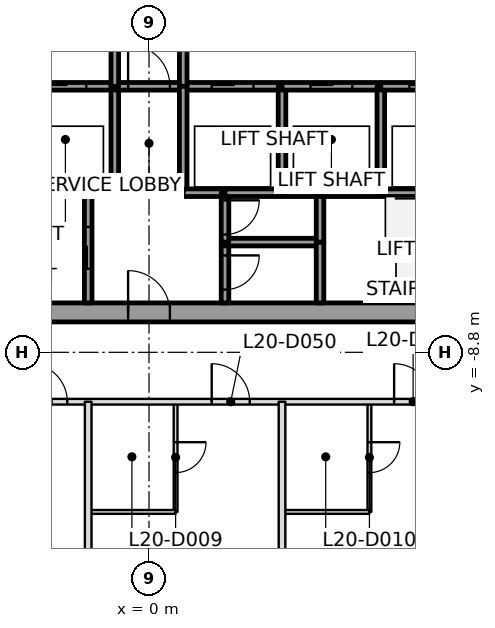
"""IFC4 building model, lengths in metres.
Left out: names, types, materials, properties, quantities, classifications, styles, units other than length and angle.
Written with IfcOpenShell. Run it as: python <this file> out.ifc"""

import sys

from ifc_helpers import new_model, si_unit, direction, frame, frame_2d, origin, place, context, subcontext, project, spatial, rectangle, extrude, element, fill, save


model = new_model("IFC4")
c1 = context("Model", 3, precision=1e-05, world=origin(), true_north=direction((0.0, 1.0)))
c2 = subcontext(c1, "Body", "Model", "MODEL_VIEW")
j1 = project(units=[si_unit("LENGTHUNIT", "METRE"), si_unit("PLANEANGLEUNIT", "RADIAN")], contexts=[c1])
p1 = place(None, origin())
s1 = spatial("IfcSite", under=j1, at=p1, CompositionType="ELEMENT")
p2 = place(p1, origin())
s2 = spatial("IfcBuilding", under=s1, at=p2, CompositionType="ELEMENT")
p3 = place(p2, frame((0.0, 0.0, 96.1)))
s3 = spatial("IfcBuildingStorey", under=s2, at=p3, CompositionType="ELEMENT", Elevation=96.1)
p4 = place(p3, frame((-11.0, -7.75, 0.0), z_axis=(0.0, 0.0, 1.0), x_axis=(1.0, 0.0, 0.0)))
e1 = element("IfcWall", 1, at=p4, inside=s3, PredefinedType="SHEAR", context=c2, shape_type="SweptSolid", body=[
    extrude(rectangle(XDim=22.0, YDim=0.5, at=frame_2d((11.0, 0.0))), origin(), (0.0, 0.0, 1.0), 3.7),
])
p5 = place(p4, frame((10.45, 0.0, 0.0)))
e2 = element("IfcOpeningElement", 2, at=p5, cuts=e1, PredefinedType="OPENING", context=c2, shape_type="SweptSolid", body=[
    extrude(rectangle(XDim=1.1, YDim=2.1, at=frame_2d((0.55, 1.05))), frame((0.0, 0.25, 0.0), z_axis=(0.0, -1.0, 0.0), x_axis=(1.0, 0.0, 0.0)), (0.0, 0.0, 1.0), 0.5),
])
p6 = place(p3, frame((-3.5, -4.6, 0.0), z_axis=(0.0, 0.0, 1.0), x_axis=(1.0, 0.0, 0.0)))
e3 = element("IfcWall", 3, at=p6, inside=s3, PredefinedType="SOLIDWALL", context=c2, shape_type="SweptSolid", body=[
    extrude(rectangle(XDim=1.9, YDim=0.2, at=frame_2d((0.95, 0.0))), origin(), (0.0, 0.0, 1.0), 3.55),
])
p7 = place(p3, frame((-3.5, -1.8, 0.0), z_axis=(0.0, 0.0, 1.0), x_axis=(1.0, 0.0, 0.0)))
e4 = element("IfcWall", 4, at=p7, inside=s3, PredefinedType="SOLIDWALL", context=c2, shape_type="SweptSolid", body=[
    extrude(rectangle(XDim=2.6, YDim=0.2, at=frame_2d((1.3, 0.0))), origin(), (0.0, 0.0, 1.0), 3.55),
])
p8 = place(p7, frame((0.75, 0.0, 0.0)))
e5 = element("IfcOpeningElement", 5, at=p8, cuts=e4, PredefinedType="OPENING", context=c2, shape_type="SweptSolid", body=[
    extrude(rectangle(XDim=1.1, YDim=2.1, at=frame_2d((0.55, 1.05))), frame((0.0, 0.1, 0.0), z_axis=(0.0, -1.0, 0.0), x_axis=(1.0, 0.0, 0.0)), (0.0, 0.0, 1.0), 0.2),
])
p9 = place(p3, frame((-1.6, -7.5, 0.0), z_axis=(0.0, 0.0, 1.0), x_axis=(0.0, 1.0, 0.0)))
e6 = element("IfcWall", 6, at=p9, inside=s3, PredefinedType="SOLIDWALL", context=c2, shape_type="SweptSolid", body=[
    extrude(rectangle(XDim=2.9, YDim=0.2, at=frame_2d((1.45, 0.0))), origin(), (0.0, 0.0, 1.0), 3.55),
])
p10 = place(p9, frame((0.9, 0.0, 0.0)))
e7 = element("IfcOpeningElement", 7, at=p10, cuts=e6, PredefinedType="OPENING", context=c2, shape_type="SweptSolid", body=[
    extrude(rectangle(XDim=1.1, YDim=2.1, at=frame_2d((0.55, 1.05))), frame((0.0, 0.1, 0.0), z_axis=(0.0, -1.0, 0.0), x_axis=(1.0, 0.0, 0.0)), (0.0, 0.0, 1.0), 0.2),
])
p11 = place(p3, frame((-1.6, -4.6, 0.0), z_axis=(0.0, 0.0, 1.0), x_axis=(1.0, 0.0, 0.0)))
e8 = element("IfcWall", 8, at=p11, inside=s3, PredefinedType="SOLIDWALL", context=c2, shape_type="SweptSolid", body=[
    extrude(rectangle(XDim=0.7, YDim=0.2, at=frame_2d((0.35, 0.0))), origin(), (0.0, 0.0, 1.0), 3.55),
])
p12 = place(p3, frame((-0.9, -4.6, 0.0), z_axis=(0.0, 0.0, 1.0), x_axis=(0.0, 1.0, 0.0)))
e9 = element("IfcWall", 9, at=p12, inside=s3, PredefinedType="SOLIDWALL", context=c2, shape_type="SweptSolid", body=[
    extrude(rectangle(XDim=2.8, YDim=0.2, at=frame_2d((1.4, 0.0))), origin(), (0.0, 0.0, 1.0), 3.55),
])
p13 = place(p3, frame((-0.9, -1.8, 0.0), z_axis=(0.0, 0.0, 1.0), x_axis=(1.0, 0.0, 0.0)))
e10 = element("IfcWall", 10, at=p13, inside=s3, PredefinedType="SOLIDWALL", context=c2, shape_type="SweptSolid", body=[
    extrude(rectangle(XDim=1.8, YDim=0.2, at=frame_2d((0.9, 0.0))), origin(), (0.0, 0.0, 1.0), 3.55),
])
p14 = place(p13, frame((0.35, 0.0, 0.0)))
e11 = element("IfcOpeningElement", 11, at=p14, cuts=e10, PredefinedType="OPENING", context=c2, shape_type="SweptSolid", body=[
    extrude(rectangle(XDim=1.1, YDim=2.1, at=frame_2d((0.55, 1.05))), frame((0.0, 0.1, 0.0), z_axis=(0.0, -1.0, 0.0), x_axis=(1.0, 0.0, 0.0)), (0.0, 0.0, 1.0), 0.2),
])
p15 = place(p3, frame((-0.9, 1.8, 0.0), z_axis=(0.0, 0.0, 1.0), x_axis=(0.0, -1.0, 0.0)))
e12 = element("IfcWall", 12, at=p15, inside=s3, PredefinedType="SOLIDWALL", context=c2, shape_type="SweptSolid", body=[
    extrude(rectangle(XDim=3.6, YDim=0.2, at=frame_2d((1.8, 0.0))), origin(), (0.0, 0.0, 1.0), 3.55),
])
p16 = place(p15, frame((1.05, 0.0, 0.0)))
e13 = element("IfcOpeningElement", 13, at=p16, cuts=e12, PredefinedType="OPENING", context=c2, shape_type="SweptSolid", body=[
    extrude(rectangle(XDim=1.5, YDim=2.1, at=frame_2d((0.75, 1.05))), frame((0.0, 0.1, 0.0), z_axis=(0.0, -1.0, 0.0), x_axis=(1.0, 0.0, 0.0)), (0.0, 0.0, 1.0), 0.2),
])
p17 = place(p3, frame((0.9, -1.8, 0.0), z_axis=(0.0, 0.0, 1.0), x_axis=(1.0, 0.0, 0.0)))
e14 = element("IfcWall", 14, at=p17, inside=s3, PredefinedType="SOLIDWALL", context=c2, shape_type="SweptSolid", body=[
    extrude(rectangle(XDim=2.6, YDim=0.2, at=frame_2d((1.3, 0.0))), origin(), (0.0, 0.0, 1.0), 3.55),
])
p18 = place(p17, frame((0.75, 0.0, 0.0)))
e15 = element("IfcOpeningElement", 15, at=p18, cuts=e14, PredefinedType="OPENING", context=c2, shape_type="SweptSolid", body=[
    extrude(rectangle(XDim=1.1, YDim=2.1, at=frame_2d((0.55, 1.05))), frame((0.0, 0.1, 0.0), z_axis=(0.0, -1.0, 0.0), x_axis=(1.0, 0.0, 0.0)), (0.0, 0.0, 1.0), 0.2),
])
p19 = place(p3, frame((0.9, -1.8, 0.0), z_axis=(0.0, 0.0, 1.0), x_axis=(0.0, 1.0, 0.0)))
e16 = element("IfcWall", 16, at=p19, inside=s3, PredefinedType="SOLIDWALL", context=c2, shape_type="SweptSolid", body=[
    extrude(rectangle(XDim=3.6, YDim=0.2, at=frame_2d((1.8, 0.0))), origin(), (0.0, 0.0, 1.0), 3.55),
])
p20 = place(p19, frame((1.05, 0.0, 0.0)))
e17 = element("IfcOpeningElement", 17, at=p20, cuts=e16, PredefinedType="OPENING", context=c2, shape_type="SweptSolid", body=[
    extrude(rectangle(XDim=1.5, YDim=2.1, at=frame_2d((0.75, 1.05))), frame((0.0, 0.1, 0.0), z_axis=(0.0, -1.0, 0.0), x_axis=(1.0, 0.0, 0.0)), (0.0, 0.0, 1.0), 0.2),
])
p21 = place(p3, frame((0.9, -1.8, 0.0), z_axis=(0.0, 0.0, 1.0), x_axis=(0.0, -1.0, 0.0)))
e18 = element("IfcWall", 18, at=p21, inside=s3, PredefinedType="SOLIDWALL", context=c2, shape_type="SweptSolid", body=[
    extrude(rectangle(XDim=2.8, YDim=0.2, at=frame_2d((1.4, 0.0))), origin(), (0.0, 0.0, 1.0), 3.55),
])
p22 = place(p3, frame((0.9, -4.6, 0.0), z_axis=(0.0, 0.0, 1.0), x_axis=(1.0, 0.0, 0.0)))
e19 = element("IfcWall", 19, at=p22, inside=s3, PredefinedType="SOLIDWALL", context=c2, shape_type="SweptSolid", body=[
    extrude(rectangle(XDim=1.1, YDim=0.2, at=frame_2d((0.55, 0.0))), origin(), (0.0, 0.0, 1.0), 3.55),
])
p23 = place(p3, frame((2.0, -5.9, 0.0), z_axis=(0.0, 0.0, 1.0), x_axis=(0.0, -1.0, 0.0)))
e20 = element("IfcWall", 20, at=p23, inside=s3, PredefinedType="SOLIDWALL", context=c2, shape_type="SweptSolid", body=[
    extrude(rectangle(XDim=1.6, YDim=0.2, at=frame_2d((0.8, 0.0))), origin(), (0.0, 0.0, 1.0), 3.55),
])
p24 = place(p23, frame((0.35, 0.0, 0.0)))
e21 = element("IfcOpeningElement", 21, at=p24, cuts=e20, PredefinedType="OPENING", context=c2, shape_type="SweptSolid", body=[
    extrude(rectangle(XDim=0.9, YDim=2.1, at=frame_2d((0.45, 1.05))), frame((0.0, 0.1, 0.0), z_axis=(0.0, -1.0, 0.0), x_axis=(1.0, 0.0, 0.0)), (0.0, 0.0, 1.0), 0.2),
])
p25 = place(p3, frame((4.5, -5.9, 0.0), z_axis=(0.0, 0.0, 1.0), x_axis=(-1.0, 0.0, 0.0)))
e22 = element("IfcWall", 22, at=p25, inside=s3, PredefinedType="SOLIDWALL", context=c2, shape_type="SweptSolid", body=[
    extrude(rectangle(XDim=2.5, YDim=0.2, at=frame_2d((1.25, 0.0))), origin(), (0.0, 0.0, 1.0), 3.55),
])
p26 = place(p3, frame((2.0, -4.6, 0.0), z_axis=(0.0, 0.0, 1.0), x_axis=(0.0, -1.0, 0.0)))
e23 = element("IfcWall", 23, at=p26, inside=s3, PredefinedType="SOLIDWALL", context=c2, shape_type="SweptSolid", body=[
    extrude(rectangle(XDim=1.3, YDim=0.2, at=frame_2d((0.65, 0.0))), origin(), (0.0, 0.0, 1.0), 3.55),
])
p27 = place(p26, frame((0.2, 0.0, 0.0)))
e24 = element("IfcOpeningElement", 24, at=p27, cuts=e23, PredefinedType="OPENING", context=c2, shape_type="SweptSolid", body=[
    extrude(rectangle(XDim=0.9, YDim=2.1, at=frame_2d((0.45, 1.05))), frame((0.0, 0.1, 0.0), z_axis=(0.0, -1.0, 0.0), x_axis=(1.0, 0.0, 0.0)), (0.0, 0.0, 1.0), 0.2),
])
p28 = place(p3, frame((3.5, -4.6, 0.0), z_axis=(0.0, 0.0, 1.0), x_axis=(-1.0, 0.0, 0.0)))
e25 = element("IfcWall", 25, at=p28, inside=s3, PredefinedType="SOLIDWALL", context=c2, shape_type="SweptSolid", body=[
    extrude(rectangle(XDim=1.5, YDim=0.2, at=frame_2d((0.75, 0.0))), origin(), (0.0, 0.0, 1.0), 3.55),
])
p29 = place(p3, frame((4.5, -4.6, 0.0), z_axis=(0.0, 0.0, 1.0), x_axis=(-1.0, 0.0, 0.0)))
e26 = element("IfcWall", 26, at=p29, inside=s3, PredefinedType="SOLIDWALL", context=c2, shape_type="SweptSolid", body=[
    extrude(rectangle(XDim=1.0, YDim=0.2, at=frame_2d((0.5, 0.0))), origin(), (0.0, 0.0, 1.0), 3.55),
])
p30 = place(p3, frame((3.5, -4.6, 0.0), z_axis=(0.0, 0.0, 1.0), x_axis=(0.0, 1.0, 0.0)))
e27 = element("IfcWall", 27, at=p30, inside=s3, PredefinedType="SOLIDWALL", context=c2, shape_type="SweptSolid", body=[
    extrude(rectangle(XDim=2.8, YDim=0.2, at=frame_2d((1.4, 0.0))), origin(), (0.0, 0.0, 1.0), 3.55),
])
p31 = place(p3, frame((3.5, -1.8, 0.0), z_axis=(0.0, 0.0, 1.0), x_axis=(1.0, 0.0, 0.0)))
e28 = element("IfcWall", 28, at=p31, inside=s3, PredefinedType="SOLIDWALL", context=c2, shape_type="SweptSolid", body=[
    extrude(rectangle(XDim=2.6, YDim=0.2, at=frame_2d((1.3, 0.0))), origin(), (0.0, 0.0, 1.0), 3.55),
])
p32 = place(p31, frame((0.75, 0.0, 0.0)))
e29 = element("IfcOpeningElement", 29, at=p32, cuts=e28, PredefinedType="OPENING", context=c2, shape_type="SweptSolid", body=[
    extrude(rectangle(XDim=1.1, YDim=2.1, at=frame_2d((0.55, 1.05))), frame((0.0, 0.1, 0.0), z_axis=(0.0, -1.0, 0.0), x_axis=(1.0, 0.0, 0.0)), (0.0, 0.0, 1.0), 0.2),
])
p33 = place(p3, frame((4.5, -7.5, 0.0), z_axis=(0.0, 0.0, 1.0), x_axis=(0.0, 1.0, 0.0)))
e30 = element("IfcWall", 30, at=p33, inside=s3, PredefinedType="SOLIDWALL", context=c2, shape_type="SweptSolid", body=[
    extrude(rectangle(XDim=1.6, YDim=0.2, at=frame_2d((0.8, 0.0))), origin(), (0.0, 0.0, 1.0), 3.55),
])
p34 = place(p3, frame((4.5, -5.9, 0.0), z_axis=(0.0, 0.0, 1.0), x_axis=(0.0, 1.0, 0.0)))
e31 = element("IfcWall", 31, at=p34, inside=s3, PredefinedType="SOLIDWALL", context=c2, shape_type="SweptSolid", body=[
    extrude(rectangle(XDim=1.3, YDim=0.2, at=frame_2d((0.65, 0.0))), origin(), (0.0, 0.0, 1.0), 3.55),
])
p35 = place(p3, frame((4.5, -4.6, 0.0), z_axis=(0.0, 0.0, 1.0), x_axis=(1.0, 0.0, 0.0)))
e32 = element("IfcWall", 32, at=p35, inside=s3, PredefinedType="SOLIDWALL", context=c2, shape_type="SweptSolid", body=[
    extrude(rectangle(XDim=1.6, YDim=0.2, at=frame_2d((0.8, 0.0))), origin(), (0.0, 0.0, 1.0), 3.55),
])
p36 = place(p3, frame((6.1, -4.6, 0.0), z_axis=(0.0, 0.0, 1.0), x_axis=(1.0, 0.0, 0.0)))
e33 = element("IfcWall", 33, at=p36, inside=s3, PredefinedType="SOLIDWALL", context=c2, shape_type="SweptSolid", body=[
    extrude(rectangle(XDim=2.6, YDim=0.2, at=frame_2d((1.3, 0.0))), origin(), (0.0, 0.0, 1.0), 3.55),
])
p37 = place(p3, frame((6.1, -4.6, 0.0), z_axis=(0.0, 0.0, 1.0), x_axis=(0.0, 1.0, 0.0)))
e34 = element("IfcWall", 34, at=p37, inside=s3, PredefinedType="SOLIDWALL", context=c2, shape_type="SweptSolid", body=[
    extrude(rectangle(XDim=2.8, YDim=0.2, at=frame_2d((1.4, 0.0))), origin(), (0.0, 0.0, 1.0), 3.55),
])
p38 = place(p3, frame((6.1, -1.8, 0.0), z_axis=(0.0, 0.0, 1.0), x_axis=(1.0, 0.0, 0.0)))
e35 = element("IfcWall", 35, at=p38, inside=s3, PredefinedType="SOLIDWALL", context=c2, shape_type="SweptSolid", body=[
    extrude(rectangle(XDim=2.6, YDim=0.2, at=frame_2d((1.3, 0.0))), origin(), (0.0, 0.0, 1.0), 3.55),
])
p39 = place(p38, frame((0.75, 0.0, 0.0)))
e36 = element("IfcOpeningElement", 36, at=p39, cuts=e35, PredefinedType="OPENING", context=c2, shape_type="SweptSolid", body=[
    extrude(rectangle(XDim=1.1, YDim=2.1, at=frame_2d((0.55, 1.05))), frame((0.0, 0.1, 0.0), z_axis=(0.0, -1.0, 0.0), x_axis=(1.0, 0.0, 0.0)), (0.0, 0.0, 1.0), 0.2),
])
p40 = place(p3, frame((-1.6, -10.1, 0.0), z_axis=(0.0, 0.0, 1.0), x_axis=(0.0, -1.0, 0.0)))
e37 = element("IfcWall", 37, at=p40, inside=s3, PredefinedType="PARTITIONING", context=c2, shape_type="SweptSolid", body=[
    extrude(rectangle(XDim=12.628, YDim=0.175, at=frame_2d((6.314, 0.0))), origin(), (0.0, 0.0, 1.0), 2.934),
])
p41 = place(p3, frame((3.5, -10.1, 0.0), z_axis=(0.0, 0.0, 1.0), x_axis=(0.0, -1.0, 0.0)))
e38 = element("IfcWall", 38, at=p41, inside=s3, PredefinedType="PARTITIONING", context=c2, shape_type="SweptSolid", body=[
    extrude(rectangle(XDim=12.593, YDim=0.175, at=frame_2d((6.296, 0.0))), origin(), (0.0, 0.0, 1.0), 2.934),
])
p42 = place(p3, frame((-13.02, -10.1, 0.0), z_axis=(0.0, 0.0, 1.0), x_axis=(1.0, 0.0, 0.0)))
e39 = element("IfcWall", 39, at=p42, inside=s3, PredefinedType="PARTITIONING", context=c2, shape_type="SweptSolid", body=[
    extrude(rectangle(XDim=26.04, YDim=0.15, at=frame_2d((13.02, 0.0))), origin(), (0.0, 0.0, 1.0), 3.017),
])
p43 = place(p42, frame((5.07, 0.0, 0.0)))
e40 = element("IfcOpeningElement", 40, at=p43, cuts=e39, PredefinedType="OPENING", context=c2, shape_type="SweptSolid", body=[
    extrude(rectangle(XDim=1.0, YDim=2.1, at=frame_2d((0.5, 1.05))), frame((0.0, 0.075, 0.0), z_axis=(0.0, -1.0, 0.0), x_axis=(1.0, 0.0, 0.0)), (0.0, 0.0, 1.0), 0.15),
])
p44 = place(p42, frame((9.87, 0.0, 0.0)))
e41 = element("IfcOpeningElement", 41, at=p44, cuts=e39, PredefinedType="OPENING", context=c2, shape_type="SweptSolid", body=[
    extrude(rectangle(XDim=1.0, YDim=2.1, at=frame_2d((0.5, 1.05))), frame((0.0, 0.075, 0.0), z_axis=(0.0, -1.0, 0.0), x_axis=(1.0, 0.0, 0.0)), (0.0, 0.0, 1.0), 0.15),
])
p45 = place(p42, frame((14.67, 0.0, 0.0)))
e42 = element("IfcOpeningElement", 42, at=p45, cuts=e39, PredefinedType="OPENING", context=c2, shape_type="SweptSolid", body=[
    extrude(rectangle(XDim=1.0, YDim=2.1, at=frame_2d((0.5, 1.05))), frame((0.0, 0.075, 0.0), z_axis=(0.0, -1.0, 0.0), x_axis=(1.0, 0.0, 0.0)), (0.0, 0.0, 1.0), 0.15),
])
p46 = place(p42, frame((19.47, 0.0, 0.0)))
e43 = element("IfcOpeningElement", 43, at=p46, cuts=e39, PredefinedType="OPENING", context=c2, shape_type="SweptSolid", body=[
    extrude(rectangle(XDim=1.0, YDim=2.1, at=frame_2d((0.5, 1.05))), frame((0.0, 0.075, 0.0), z_axis=(0.0, -1.0, 0.0), x_axis=(1.0, 0.0, 0.0)), (0.0, 0.0, 1.0), 0.15),
])
p47 = place(p3, frame((0.7, -10.13, 0.0), z_axis=(0.0, 0.0, 1.0), x_axis=(0.0, -1.0, 0.0)))
e44 = element("IfcWall", 44, at=p47, inside=s3, PredefinedType="PARTITIONING", context=c2, shape_type="SweptSolid", body=[
    extrude(rectangle(XDim=2.87, YDim=0.1, at=frame_2d((1.435, 0.0))), origin(), (0.0, 0.0, 1.0), 3.15),
])
p48 = place(p47, frame((1.035, 0.0, 0.0)))
e45 = element("IfcOpeningElement", 45, at=p48, cuts=e44, PredefinedType="OPENING", context=c2, shape_type="SweptSolid", body=[
    extrude(rectangle(XDim=0.8, YDim=2.1, at=frame_2d((0.4, 1.05))), frame((0.0, 0.05, 0.0), z_axis=(0.0, -1.0, 0.0), x_axis=(1.0, 0.0, 0.0)), (0.0, 0.0, 1.0), 0.1),
])
p49 = place(p3, frame((0.7, -13.0, 0.0), z_axis=(0.0, 0.0, 1.0), x_axis=(-1.0, 0.0, 0.0)))
e46 = element("IfcWall", 46, at=p49, inside=s3, PredefinedType="PARTITIONING", context=c2, shape_type="SweptSolid", body=[
    extrude(rectangle(XDim=2.27, YDim=0.1, at=frame_2d((1.135, 0.0))), origin(), (0.0, 0.0, 1.0), 3.017),
])
p50 = place(p3, frame((5.8, -10.13, 0.0), z_axis=(0.0, 0.0, 1.0), x_axis=(0.0, -1.0, 0.0)))
e47 = element("IfcWall", 47, at=p50, inside=s3, PredefinedType="PARTITIONING", context=c2, shape_type="SweptSolid", body=[
    extrude(rectangle(XDim=2.87, YDim=0.1, at=frame_2d((1.435, 0.0))), origin(), (0.0, 0.0, 1.0), 3.15),
])
p51 = place(p50, frame((1.035, 0.0, 0.0)))
e48 = element("IfcOpeningElement", 48, at=p51, cuts=e47, PredefinedType="OPENING", context=c2, shape_type="SweptSolid", body=[
    extrude(rectangle(XDim=0.8, YDim=2.1, at=frame_2d((0.4, 1.05))), frame((0.0, 0.05, 0.0), z_axis=(0.0, -1.0, 0.0), x_axis=(1.0, 0.0, 0.0)), (0.0, 0.0, 1.0), 0.1),
])
p52 = place(p3, frame((5.8, -13.0, 0.0), z_axis=(0.0, 0.0, 1.0), x_axis=(-1.0, 0.0, 0.0)))
e49 = element("IfcWall", 49, at=p52, inside=s3, PredefinedType="PARTITIONING", context=c2, shape_type="SweptSolid", body=[
    extrude(rectangle(XDim=2.27, YDim=0.1, at=frame_2d((1.135, 0.0))), origin(), (0.0, 0.0, 1.0), 3.017),
])
p53 = place(p44, origin())
e50 = element("IfcDoor", 50, at=p53, inside=s3, OperationType="SINGLE_SWING_LEFT", PredefinedType="DOOR", context=c2, shape_type="SweptSolid", body=[
    extrude(rectangle(XDim=1.0, YDim=2.1, at=frame_2d((0.5, 1.05))), frame((0.0, 0.025, 0.0), z_axis=(0.0, -1.0, 0.0), x_axis=(1.0, 0.0, 0.0)), (0.0, 0.0, 1.0), 0.05),
])
fill(e41, e50)
p54 = place(p45, origin())
e51 = element("IfcDoor", 51, at=p54, inside=s3, OperationType="SINGLE_SWING_LEFT", PredefinedType="DOOR", context=c2, shape_type="SweptSolid", body=[
    extrude(rectangle(XDim=1.0, YDim=2.1, at=frame_2d((0.5, 1.05))), frame((0.0, 0.025, 0.0), z_axis=(0.0, -1.0, 0.0), x_axis=(1.0, 0.0, 0.0)), (0.0, 0.0, 1.0), 0.05),
])
fill(e42, e51)
p55 = place(p48, origin())
e52 = element("IfcDoor", 52, at=p55, inside=s3, OperationType="SINGLE_SWING_RIGHT", PredefinedType="DOOR", context=c2, shape_type="SweptSolid", body=[
    extrude(rectangle(XDim=0.8, YDim=2.1, at=frame_2d((0.4, 1.05))), frame((0.0, 0.025, 0.0), z_axis=(0.0, -1.0, 0.0), x_axis=(1.0, 0.0, 0.0)), (0.0, 0.0, 1.0), 0.05),
])
fill(e45, e52)
p56 = place(p46, origin())
e53 = element("IfcDoor", 53, at=p56, inside=s3, OperationType="SINGLE_SWING_LEFT", PredefinedType="DOOR", context=c2, shape_type="SweptSolid", body=[
    extrude(rectangle(XDim=1.0, YDim=2.1, at=frame_2d((0.5, 1.05))), frame((0.0, 0.025, 0.0), z_axis=(0.0, -1.0, 0.0), x_axis=(1.0, 0.0, 0.0)), (0.0, 0.0, 1.0), 0.05),
])
fill(e43, e53)
p57 = place(p51, origin())
e54 = element("IfcDoor", 54, at=p57, inside=s3, OperationType="SINGLE_SWING_RIGHT", PredefinedType="DOOR", context=c2, shape_type="SweptSolid", body=[
    extrude(rectangle(XDim=0.8, YDim=2.1, at=frame_2d((0.4, 1.05))), frame((0.0, 0.025, 0.0), z_axis=(0.0, -1.0, 0.0), x_axis=(1.0, 0.0, 0.0)), (0.0, 0.0, 1.0), 0.05),
])
fill(e48, e54)
p58 = place(p8, origin())
e55 = element("IfcDoor", 55, at=p58, inside=s3, OperationType="SLIDING_TO_RIGHT", PredefinedType="DOOR", context=c2, shape_type="SweptSolid", body=[
    extrude(rectangle(XDim=1.1, YDim=2.1, at=frame_2d((0.55, 1.05))), frame((0.0, 0.025, 0.0), z_axis=(0.0, -1.0, 0.0), x_axis=(1.0, 0.0, 0.0)), (0.0, 0.0, 1.0), 0.05),
])
fill(e5, e55)
p59 = place(p18, origin())
e56 = element("IfcDoor", 56, at=p59, inside=s3, OperationType="SLIDING_TO_RIGHT", PredefinedType="DOOR", context=c2, shape_type="SweptSolid", body=[
    extrude(rectangle(XDim=1.1, YDim=2.1, at=frame_2d((0.55, 1.05))), frame((0.0, 0.025, 0.0), z_axis=(0.0, -1.0, 0.0), x_axis=(1.0, 0.0, 0.0)), (0.0, 0.0, 1.0), 0.05),
])
fill(e15, e56)
p60 = place(p32, origin())
e57 = element("IfcDoor", 57, at=p60, inside=s3, OperationType="SLIDING_TO_LEFT", PredefinedType="DOOR", context=c2, shape_type="SweptSolid", body=[
    extrude(rectangle(XDim=1.1, YDim=2.1, at=frame_2d((0.55, 1.05))), frame((0.0, 0.025, 0.0), z_axis=(0.0, -1.0, 0.0), x_axis=(1.0, 0.0, 0.0)), (0.0, 0.0, 1.0), 0.05),
])
fill(e29, e57)
p61 = place(p39, origin())
e58 = element("IfcDoor", 58, at=p61, inside=s3, OperationType="SLIDING_TO_RIGHT", PredefinedType="DOOR", context=c2, shape_type="SweptSolid", body=[
    extrude(rectangle(XDim=1.1, YDim=2.1, at=frame_2d((0.55, 1.05))), frame((0.0, 0.025, 0.0), z_axis=(0.0, -1.0, 0.0), x_axis=(1.0, 0.0, 0.0)), (0.0, 0.0, 1.0), 0.05),
])
fill(e36, e58)
p62 = place(p10, origin())
e59 = element("IfcDoor", 59, at=p62, inside=s3, OperationType="SLIDING_TO_LEFT", PredefinedType="DOOR", context=c2, shape_type="SweptSolid", body=[
    extrude(rectangle(XDim=1.1, YDim=2.1, at=frame_2d((0.55, 1.05))), frame((0.0, 0.025, 0.0), z_axis=(0.0, -1.0, 0.0), x_axis=(1.0, 0.0, 0.0)), (0.0, 0.0, 1.0), 0.05),
])
fill(e7, e59)
p63 = place(p14, origin())
e60 = element("IfcDoor", 60, at=p63, inside=s3, OperationType="SINGLE_SWING_RIGHT", PredefinedType="DOOR", context=c2, shape_type="SweptSolid", body=[
    extrude(rectangle(XDim=1.1, YDim=2.1, at=frame_2d((0.55, 1.05))), frame((0.0, 0.025, 0.0), z_axis=(0.0, -1.0, 0.0), x_axis=(1.0, 0.0, 0.0)), (0.0, 0.0, 1.0), 0.05),
])
fill(e11, e60)
p64 = place(p24, origin())
e61 = element("IfcDoor", 61, at=p64, inside=s3, OperationType="SINGLE_SWING_LEFT", PredefinedType="DOOR", context=c2, shape_type="SweptSolid", body=[
    extrude(rectangle(XDim=0.9, YDim=2.1, at=frame_2d((0.45, 1.05))), frame((0.0, 0.025, 0.0), z_axis=(0.0, -1.0, 0.0), x_axis=(1.0, 0.0, 0.0)), (0.0, 0.0, 1.0), 0.05),
])
fill(e21, e61)
p65 = place(p27, origin())
e62 = element("IfcDoor", 62, at=p65, inside=s3, OperationType="SINGLE_SWING_RIGHT", PredefinedType="DOOR", context=c2, shape_type="SweptSolid", body=[
    extrude(rectangle(XDim=0.9, YDim=2.1, at=frame_2d((0.45, 1.05))), frame((0.0, 0.025, 0.0), z_axis=(0.0, -1.0, 0.0), x_axis=(1.0, 0.0, 0.0)), (0.0, 0.0, 1.0), 0.05),
])
fill(e24, e62)
p66 = place(p5, origin())
e63 = element("IfcDoor", 63, at=p66, inside=s3, OperationType="SINGLE_SWING_RIGHT", PredefinedType="DOOR", context=c2, shape_type="SweptSolid", body=[
    extrude(rectangle(XDim=1.1, YDim=2.1, at=frame_2d((0.55, 1.05))), frame((0.0, 0.025, 0.0), z_axis=(0.0, -1.0, 0.0), x_axis=(1.0, 0.0, 0.0)), (0.0, 0.0, 1.0), 0.05),
])
fill(e2, e63)
save(model, sys.argv[1])
